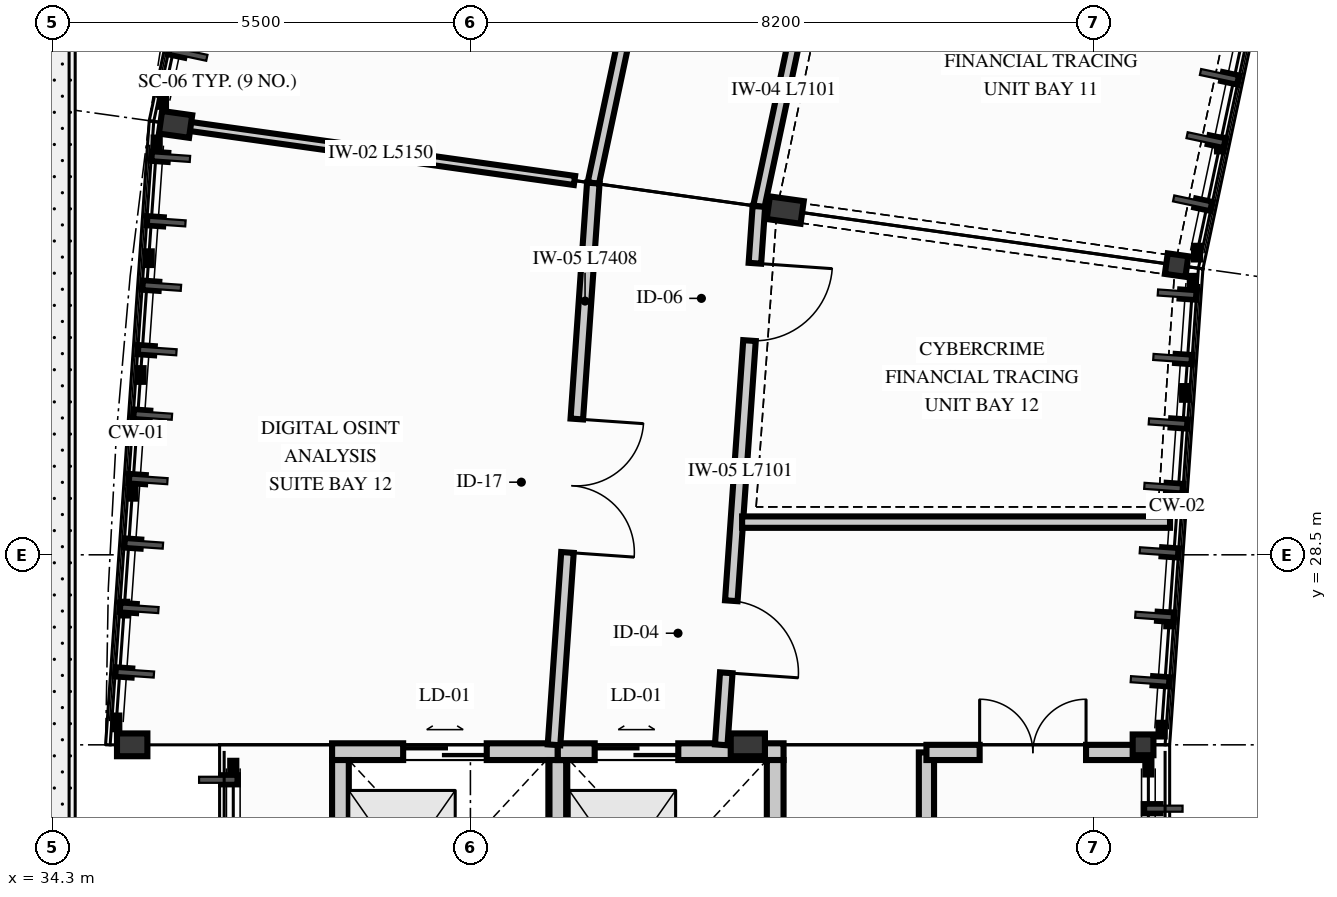
"""IFC4 building model, lengths in metres.
Left out: names, types, materials, properties, quantities, classifications, styles, units other than length and angle.
Written with IfcOpenShell. Run it as: python <this file> out.ifc"""

import sys

from ifc_helpers import new_model, si_unit, direction, frame, frame_2d, origin, origin_2d, place, context, subcontext, project, spatial, rectangle, hollow_circle, i_section, extrude, element, fill, save


model = new_model("IFC4")
c1 = context("Model", 3, precision=1e-05, world=origin(), true_north=direction((0.0, 1.0)))
c2 = subcontext(c1, "Body", "Model", "MODEL_VIEW")
j1 = project(units=[si_unit("LENGTHUNIT", "METRE"), si_unit("PLANEANGLEUNIT", "RADIAN")], contexts=[c1])
p1 = place(None, origin())
s1 = spatial("IfcSite", under=j1, at=p1, CompositionType="ELEMENT")
p2 = place(p1, origin())
s2 = spatial("IfcBuilding", under=s1, at=p2, CompositionType="ELEMENT")
p3 = place(p2, frame((0.0, 0.0, 13.5)))
s3 = spatial("IfcBuildingStorey", under=s2, at=p3, CompositionType="ELEMENT", Elevation=13.5)
p4 = place(p3, frame((49.091, 32.312, 0.0), z_axis=(0.0, 0.0, 1.0), x_axis=(0.13917310096, 0.990268068742, 0.0)))
e1 = element("IfcColumn", 1, at=p4, inside=s3, PredefinedType="COLUMN", context=c2, shape_type="SweptSolid", body=[
    extrude(hollow_circle(Radius=0.136, WallThickness=0.012, at=origin_2d()), origin(), (0.0, 0.0, 1.0), 4.2),
])
p5 = place(p3, frame((43.942, 33.035, 0.0), z_axis=(0.0, 0.0, 1.0), x_axis=(0.13917310096, 0.990268068742, 0.0)))
e2 = element("IfcColumn", 2, at=p5, inside=s3, PredefinedType="COLUMN", context=c2, shape_type="SweptSolid", body=[
    extrude(i_section(OverallWidth=0.3, OverallDepth=0.45, WebThickness=0.014, FlangeThickness=0.026, FilletRadius=0.027, at=origin_2d()), origin(), (0.0, 0.0, 1.0), 4.2),
])
p6 = place(p3, frame((35.921, 34.163, 0.0), z_axis=(0.0, 0.0, 1.0), x_axis=(0.13917310096, 0.990268068742, 0.0)))
e3 = element("IfcColumn", 3, at=p6, inside=s3, PredefinedType="COLUMN", context=c2, shape_type="SweptSolid", body=[
    extrude(i_section(OverallWidth=0.3, OverallDepth=0.4, WebThickness=0.013, FlangeThickness=0.024, FilletRadius=0.027, at=origin_2d()), origin(), (0.0, 0.0, 1.0), 4.2),
])
p7 = place(p3, frame((48.65, 26.0, 0.0), z_axis=(0.0, 0.0, 1.0), x_axis=(0.0, 1.0, 0.0)))
e4 = element("IfcColumn", 4, at=p7, inside=s3, PredefinedType="COLUMN", context=c2, shape_type="SweptSolid", body=[
    extrude(hollow_circle(Radius=0.136, WallThickness=0.012, at=origin_2d()), origin(), (0.0, 0.0, 1.0), 4.2),
])
p8 = place(p3, frame((43.45, 26.0, 0.0), z_axis=(0.0, 0.0, 1.0), x_axis=(0.0, 1.0, 0.0)))
e5 = element("IfcColumn", 5, at=p8, inside=s3, PredefinedType="COLUMN", context=c2, shape_type="SweptSolid", body=[
    extrude(i_section(OverallWidth=0.3, OverallDepth=0.45, WebThickness=0.014, FlangeThickness=0.026, FilletRadius=0.027, at=origin_2d()), origin(), (0.0, 0.0, 1.0), 4.2),
])
p9 = place(p3, frame((35.35, 26.0, 0.0), z_axis=(0.0, 0.0, 1.0), x_axis=(0.0, 1.0, 0.0)))
e6 = element("IfcColumn", 6, at=p9, inside=s3, PredefinedType="COLUMN", context=c2, shape_type="SweptSolid", body=[
    extrude(i_section(OverallWidth=0.3, OverallDepth=0.4, WebThickness=0.013, FlangeThickness=0.024, FilletRadius=0.027, at=origin_2d()), origin(), (0.0, 0.0, 1.0), 4.2),
])
p10 = place(p3, frame((37.98, 25.91, 0.0), z_axis=(0.0, 0.0, 1.0), x_axis=(1.0, 0.0, 0.0)))
e7 = element("IfcWall", 7, at=p10, inside=s3, PredefinedType="PARTITIONING", context=c2, shape_type="SweptSolid", body=[
    extrude(rectangle(XDim=2.97, YDim=0.22, at=frame_2d((1.485, 0.0))), origin(), (0.0, 0.0, 1.0), 3.55),
])
p11 = place(p10, frame((0.935, 0.0, 0.0)))
e8 = element("IfcOpeningElement", 8, at=p11, cuts=e7, PredefinedType="OPENING", context=c2, shape_type="SweptSolid", body=[
    extrude(rectangle(XDim=1.1, YDim=2.15, at=frame_2d((0.55, 1.075))), frame((0.0, 0.12, 0.0), z_axis=(0.0, -1.0, 0.0), x_axis=(1.0, 0.0, 0.0)), (0.0, 0.0, 1.0), 0.24),
])
for number, where, z_axis, x_axis in (
    (9, (38.09, 23.16, 0.0), (0.0, 0.0, 1.0), (0.0, 1.0, 0.0)),
    (10, (40.95, 23.16, 0.0), (0.0, 0.0, 1.0), (0.0, 1.0, 0.0)),
):
    element("IfcWall", number, at=place(p3, frame(where, z_axis=z_axis, x_axis=x_axis)), inside=s3, PredefinedType="PARTITIONING", context=c2, shape_type="SweptSolid", body=[
        extrude(rectangle(XDim=2.64, YDim=0.22, at=frame_2d((1.32, 0.0))), origin(), (0.0, 0.0, 1.0), 3.98),
    ])
p12 = place(p3, frame((40.95, 25.91, 0.0), z_axis=(0.0, 0.0, 1.0), x_axis=(1.0, 0.0, 0.0)))
e11 = element("IfcWall", 11, at=p12, inside=s3, PredefinedType="PARTITIONING", context=c2, shape_type="SweptSolid", body=[
    extrude(rectangle(XDim=2.97, YDim=0.22, at=frame_2d((1.485, 0.0))), origin(), (0.0, 0.0, 1.0), 3.55),
])
p13 = place(p12, frame((0.485, 0.0, 0.0)))
e12 = element("IfcOpeningElement", 12, at=p13, cuts=e11, PredefinedType="OPENING", context=c2, shape_type="SweptSolid", body=[
    extrude(rectangle(XDim=1.1, YDim=2.15, at=frame_2d((0.55, 1.075))), frame((0.0, 0.12, 0.0), z_axis=(0.0, -1.0, 0.0), x_axis=(1.0, 0.0, 0.0)), (0.0, 0.0, 1.0), 0.24),
])
p14 = place(p3, frame((43.81, 23.16, 0.0), z_axis=(0.0, 0.0, 1.0), x_axis=(0.0, 1.0, 0.0)))
e13 = element("IfcWall", 13, at=p14, inside=s3, PredefinedType="PARTITIONING", context=c2, shape_type="SweptSolid", body=[
    extrude(rectangle(XDim=2.64, YDim=0.22, at=frame_2d((1.32, 0.0))), origin(), (0.0, 0.0, 1.0), 3.98),
])
p15 = place(p3, frame((45.8, 22.9, 0.0), z_axis=(0.0, 0.0, 1.0), x_axis=(0.0, 1.0, 0.0)))
e14 = element("IfcWall", 14, at=p15, inside=s3, PredefinedType="PARTITIONING", context=c2, shape_type="SweptSolid", body=[
    extrude(rectangle(XDim=3.0, YDim=0.2, at=frame_2d((1.5, 0.0))), origin(), (0.0, 0.0, 1.0), 3.98),
])
p16 = place(p15, frame((0.75, 0.0, 0.0)))
e15 = element("IfcOpeningElement", 15, at=p16, cuts=e14, PredefinedType="OPENING", context=c2, shape_type="SweptSolid", body=[
    extrude(rectangle(XDim=1.25, YDim=2.2, at=frame_2d((0.625, 1.1))), frame((0.0, 0.11, 0.0), z_axis=(0.0, -1.0, 0.0), x_axis=(1.0, 0.0, 0.0)), (0.0, 0.0, 1.0), 0.22),
])
p17 = place(p3, frame((45.8, 25.9, 0.0), z_axis=(0.0, 0.0, 1.0), x_axis=(1.0, 0.0, 0.0)))
e16 = element("IfcWall", 16, at=p17, inside=s3, PredefinedType="PARTITIONING", context=c2, shape_type="SweptSolid", body=[
    extrude(rectangle(XDim=2.85, YDim=0.2, at=frame_2d((1.425, 0.0))), origin(), (0.0, 0.0, 1.0), 3.6),
])
p18 = place(p17, frame((0.7, 0.0, 0.0)))
e17 = element("IfcOpeningElement", 17, at=p18, cuts=e16, PredefinedType="OPENING", context=c2, shape_type="SweptSolid", body=[
    extrude(rectangle(XDim=1.4, YDim=2.25, at=frame_2d((0.7, 1.125))), frame((0.0, 0.11, 0.0), z_axis=(0.0, -1.0, 0.0), x_axis=(1.0, 0.0, 0.0)), (0.0, 0.0, 1.0), 0.22),
])
p19 = place(p3, frame((45.072, 40.03, 0.0), z_axis=(0.0, 0.0, 1.0), x_axis=(-0.207903987445, -0.978149238104, 0.0)))
e18 = element("IfcWall", 18, at=p19, inside=s3, PredefinedType="PARTITIONING", context=c2, shape_type="SweptSolid", body=[
    extrude(rectangle(XDim=7.101, YDim=0.15, at=frame_2d((3.551, 0.0))), origin(), (0.0, 0.0, 1.0), 3.98),
])
p20 = place(p19, frame((2.982, 0.0, 0.0)))
e19 = element("IfcOpeningElement", 19, at=p20, cuts=e18, PredefinedType="OPENING", context=c2, shape_type="SweptSolid", body=[
    extrude(rectangle(XDim=0.98, YDim=2.16, at=frame_2d((0.49, 1.08))), frame((0.0, 0.085, 0.0), z_axis=(0.0, -1.0, 0.0), x_axis=(1.0, 0.0, 0.0)), (0.0, 0.0, 1.0), 0.17),
])
p21 = place(p3, frame((42.957, 40.636, 0.0), z_axis=(0.0, 0.0, 1.0), x_axis=(-0.207921820376, -0.978145447575, 0.0)))
e20 = element("IfcWall", 20, at=p21, inside=s3, PredefinedType="PARTITIONING", context=c2, shape_type="SweptSolid", body=[
    extrude(rectangle(XDim=7.408, YDim=0.15, at=frame_2d((3.704, 0.0))), origin(), (0.0, 0.0, 1.0), 3.98),
])
p22 = place(p21, frame((3.111, 0.0, 0.0)))
e21 = element("IfcOpeningElement", 21, at=p22, cuts=e20, PredefinedType="OPENING", context=c2, shape_type="SweptSolid", body=[
    extrude(rectangle(XDim=0.9, YDim=2.1, at=frame_2d((0.45, 1.05))), frame((0.0, 0.085, 0.0), z_axis=(0.0, -1.0, 0.0), x_axis=(1.0, 0.0, 0.0)), (0.0, 0.0, 1.0), 0.17),
])
p23 = place(p3, frame((41.169, 33.425, 0.0), z_axis=(0.0, 0.0, 1.0), x_axis=(-0.990266484291, 0.13918437445, 0.0)))
e22 = element("IfcWall", 22, at=p23, inside=s3, PredefinedType="PARTITIONING", context=c2, shape_type="SweptSolid", body=[
    extrude(rectangle(XDim=5.15, YDim=0.12, at=frame_2d((2.575, 0.0))), origin(), (0.0, 0.0, 1.0), 3.55),
])
p24 = place(p3, frame((43.595, 33.084, 0.0), z_axis=(0.0, 0.0, 1.0), x_axis=(-0.069756597752, -0.997564041588, 0.0)))
e23 = element("IfcWall", 23, at=p24, inside=s3, PredefinedType="PARTITIONING", context=c2, shape_type="SweptSolid", body=[
    extrude(rectangle(XDim=7.101, YDim=0.165, at=frame_2d((3.551, 0.0))), origin(), (0.0, 0.0, 1.0), 3.98),
])
p25 = place(p24, frame((5.201, 0.0, 0.0)))
e24 = element("IfcOpeningElement", 24, at=p25, cuts=e23, PredefinedType="OPENING", context=c2, shape_type="SweptSolid", body=[
    extrude(rectangle(XDim=0.95, YDim=2.15, at=frame_2d((0.475, 1.075))), frame((0.0, 0.093, 0.0), z_axis=(0.0, -1.0, 0.0), x_axis=(1.0, 0.0, 0.0)), (0.0, 0.0, 1.0), 0.185),
])
p26 = place(p24, frame((0.75, 0.0, 0.0)))
e25 = element("IfcOpeningElement", 25, at=p26, cuts=e23, PredefinedType="OPENING", context=c2, shape_type="SweptSolid", body=[
    extrude(rectangle(XDim=1.02, YDim=2.18, at=frame_2d((0.51, 1.09))), frame((0.0, 0.093, 0.0), z_axis=(0.0, -1.0, 0.0), x_axis=(1.0, 0.0, 0.0)), (0.0, 0.0, 1.0), 0.185),
])
p27 = place(p3, frame((41.417, 33.39, 0.0), z_axis=(0.0, 0.0, 1.0), x_axis=(-0.069766817412, -0.997563326906, 0.0)))
e26 = element("IfcWall", 26, at=p27, inside=s3, PredefinedType="PARTITIONING", context=c2, shape_type="SweptSolid", body=[
    extrude(rectangle(XDim=7.408, YDim=0.165, at=frame_2d((3.704, 0.0))), origin(), (0.0, 0.0, 1.0), 3.98),
])
p28 = place(p27, frame((3.111, 0.0, 0.0)))
e27 = element("IfcOpeningElement", 27, at=p28, cuts=e26, PredefinedType="OPENING", context=c2, shape_type="SweptSolid", body=[
    extrude(rectangle(XDim=1.76, YDim=2.36, at=frame_2d((0.88, 1.18))), frame((0.0, 0.093, 0.0), z_axis=(0.0, -1.0, 0.0), x_axis=(1.0, 0.0, 0.0)), (0.0, 0.0, 1.0), 0.185),
])
p29 = place(p3, frame((43.375, 28.93, 0.0), z_axis=(0.0, 0.0, 1.0), x_axis=(1.0, 0.0, 0.0)))
e28 = element("IfcWall", 28, at=p29, inside=s3, PredefinedType="PARTITIONING", context=c2, shape_type="SweptSolid", body=[
    extrude(rectangle(XDim=5.63, YDim=0.15, at=frame_2d((2.815, 0.0))), origin(), (0.0, 0.0, 1.0), 3.698),
])
p30 = place(p11, origin())
e29 = element("IfcDoor", 29, at=p30, inside=s3, OperationType="DOUBLE_DOOR_SLIDING", PredefinedType="DOOR", context=c2, shape_type="SweptSolid", body=[
    extrude(rectangle(XDim=1.1, YDim=2.15, at=frame_2d((0.55, 1.075))), frame((0.0, 0.025, 0.0), z_axis=(0.0, -1.0, 0.0), x_axis=(1.0, 0.0, 0.0)), (0.0, 0.0, 1.0), 0.05),
])
fill(e8, e29)
p31 = place(p13, origin())
e30 = element("IfcDoor", 30, at=p31, inside=s3, OperationType="DOUBLE_DOOR_SLIDING", PredefinedType="DOOR", context=c2, shape_type="SweptSolid", body=[
    extrude(rectangle(XDim=1.1, YDim=2.15, at=frame_2d((0.55, 1.075))), frame((0.0, 0.025, 0.0), z_axis=(0.0, -1.0, 0.0), x_axis=(1.0, 0.0, 0.0)), (0.0, 0.0, 1.0), 0.05),
])
fill(e12, e30)
p32 = place(p18, origin())
e31 = element("IfcDoor", 31, at=p32, inside=s3, OperationType="DOUBLE_DOOR_SINGLE_SWING", PredefinedType="DOOR", context=c2, shape_type="SweptSolid", body=[
    extrude(rectangle(XDim=1.4, YDim=2.25, at=frame_2d((0.7, 1.125))), frame((0.0, 0.025, 0.0), z_axis=(0.0, -1.0, 0.0), x_axis=(1.0, 0.0, 0.0)), (0.0, 0.0, 1.0), 0.05),
])
fill(e17, e31)
p33 = place(p25, origin())
e32 = element("IfcDoor", 32, at=p33, inside=s3, OperationType="SINGLE_SWING_RIGHT", PredefinedType="DOOR", context=c2, shape_type="SweptSolid", body=[
    extrude(rectangle(XDim=0.95, YDim=2.15, at=frame_2d((0.475, 1.075))), frame((0.0, 0.025, 0.0), z_axis=(0.0, -1.0, 0.0), x_axis=(1.0, 0.0, 0.0)), (0.0, 0.0, 1.0), 0.05),
])
fill(e24, e32)
p34 = place(p26, origin())
e33 = element("IfcDoor", 33, at=p34, inside=s3, OperationType="SINGLE_SWING_LEFT", PredefinedType="DOOR", context=c2, shape_type="SweptSolid", body=[
    extrude(rectangle(XDim=1.02, YDim=2.18, at=frame_2d((0.51, 1.09))), frame((0.0, 0.025, 0.0), z_axis=(0.0, -1.0, 0.0), x_axis=(1.0, 0.0, 0.0)), (0.0, 0.0, 1.0), 0.05),
])
fill(e25, e33)
p35 = place(p28, origin())
e34 = element("IfcDoor", 34, at=p35, inside=s3, OperationType="DOUBLE_DOOR_SINGLE_SWING", PredefinedType="DOOR", context=c2, shape_type="SweptSolid", body=[
    extrude(rectangle(XDim=1.76, YDim=2.36, at=frame_2d((0.88, 1.18))), frame((0.0, 0.025, 0.0), z_axis=(0.0, -1.0, 0.0), x_axis=(1.0, 0.0, 0.0)), (0.0, 0.0, 1.0), 0.05),
])
fill(e27, e34)
save(model, sys.argv[1])
